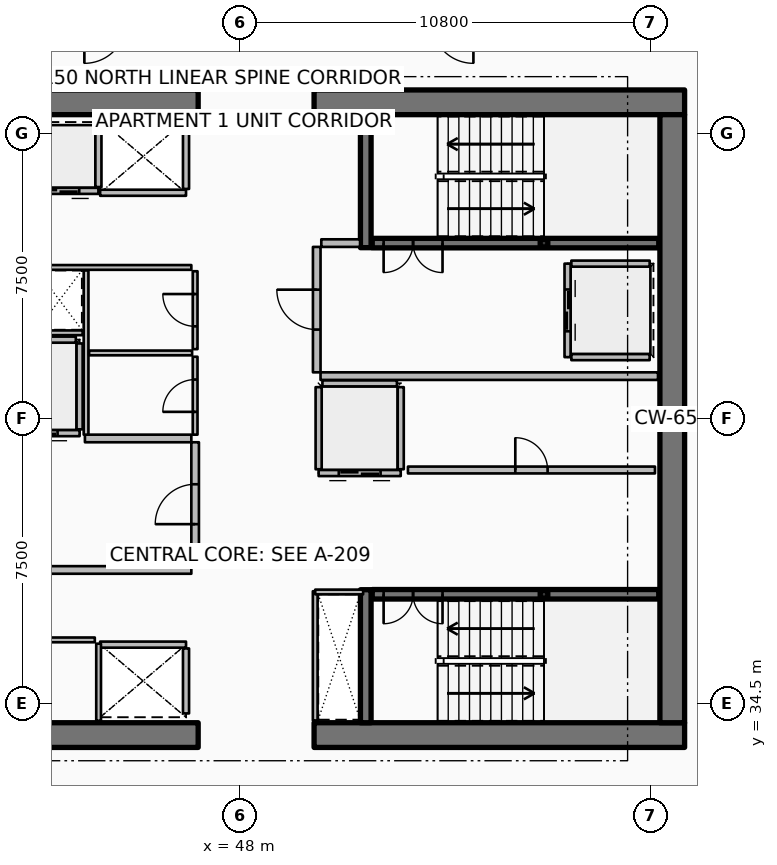
"""IFC4 building model, lengths in metres.
Left out: names, types, materials, properties, quantities, classifications, styles, units other than length and angle.
Written with IfcOpenShell. Run it as: python <this file> out.ifc"""

import sys

from ifc_helpers import new_model, si_unit, direction, frame, frame_2d, origin, origin_2d, place, context, subcontext, project, spatial, rectangle, hollow_rectangle, extrude, element, fill, save


model = new_model("IFC4")
c1 = context("Model", 3, precision=1e-05, world=origin(), true_north=direction((0.0, 1.0)))
c2 = subcontext(c1, "Body", "Model", "MODEL_VIEW")
j1 = project(units=[si_unit("LENGTHUNIT", "METRE"), si_unit("PLANEANGLEUNIT", "RADIAN")], contexts=[c1])
p1 = place(None, origin())
s1 = spatial("IfcSite", under=j1, at=p1, CompositionType="ELEMENT")
p2 = place(p1, origin())
s2 = spatial("IfcBuilding", under=s1, at=p2, CompositionType="ELEMENT")
p3 = place(p2, frame((0.0, 0.0, 199.05)))
s3 = spatial("IfcBuildingStorey", under=s2, at=p3, CompositionType="ELEMENT", Elevation=199.05)
for number, where, z_axis, x_axis in (
    (1, (37.15, 33.675, 0.0), (0.0, 0.0, 1.0), (1.0, 0.0, 0.0)),
    (2, (49.95, 33.675, 0.0), (0.0, 0.0, 1.0), (1.0, 0.0, 0.0)),
    (3, (37.15, 50.325, 0.0), (0.0, 0.0, 1.0), (1.0, 0.0, 0.0)),
    (4, (49.95, 50.325, 0.0), (0.0, 0.0, 1.0), (1.0, 0.0, 0.0)),
):
    element("IfcWall", number, at=place(p3, frame(where, z_axis=z_axis, x_axis=x_axis)), inside=s3, PredefinedType="SHEAR", context=c2, shape_type="SweptSolid", body=[
        extrude(rectangle(XDim=9.75, YDim=0.65, at=frame_2d((4.875, 0.0))), origin(), (0.0, 0.0, 1.0), 3.75),
    ])
p4 = place(p3, frame((59.375, 34.0, 0.0), z_axis=(0.0, 0.0, 1.0), x_axis=(0.0, 1.0, 0.0)))
e5 = element("IfcWall", 5, at=p4, inside=s3, PredefinedType="SHEAR", context=c2, shape_type="SweptSolid", body=[
    extrude(rectangle(XDim=16.0, YDim=0.65, at=frame_2d((8.0, 0.0))), origin(), (0.0, 0.0, 1.0), 3.75),
])
for number, where, z_axis, x_axis in (
    (6, (51.31, 46.5, 0.0), (0.0, 0.0, 1.0), (0.0, 1.0, 0.0)),
    (7, (51.31, 34.0, 0.0), (0.0, 0.0, 1.0), (0.0, 1.0, 0.0)),
):
    element("IfcWall", number, at=place(p3, frame(where, z_axis=z_axis, x_axis=x_axis)), inside=s3, PredefinedType="SHEAR", context=c2, shape_type="SweptSolid", body=[
        extrude(rectangle(XDim=3.5, YDim=0.28, at=frame_2d((1.75, 0.0))), origin(), (0.0, 0.0, 1.0), 3.75),
    ])
for number, where, z_axis, x_axis in (
    (8, (56.0, 46.62, 0.0), (0.0, 0.0, 1.0), (1.0, 0.0, 0.0)),
    (9, (56.0, 37.38, 0.0), (0.0, 0.0, 1.0), (1.0, 0.0, 0.0)),
):
    element("IfcColumn", number, at=place(p3, frame(where, z_axis=z_axis, x_axis=x_axis)), inside=s3, PredefinedType="COLUMN", context=c2, shape_type="SweptSolid", body=[
        extrude(hollow_rectangle(XDim=0.2, YDim=0.2, WallThickness=0.01, InnerFilletRadius=0.01, OuterFilletRadius=0.02, at=origin_2d()), origin(), (0.0, 0.0, 1.0), 1.67),
    ])
p5 = place(p3, frame((51.48, 46.62, 0.0), z_axis=(0.0, 0.0, 1.0), x_axis=(1.0, 0.0, 0.0)))
e10 = element("IfcWall", 10, at=p5, inside=s3, PredefinedType="SOLIDWALL", context=c2, shape_type="SweptSolid", body=[
    extrude(rectangle(XDim=7.54, YDim=0.25, at=frame_2d((3.77, 0.0))), origin(), (0.0, 0.0, 1.0), 3.5),
])
p6 = place(p5, frame((0.3, 0.0, 0.0)))
e11 = element("IfcOpeningElement", 11, at=p6, cuts=e10, PredefinedType="OPENING", context=c2, shape_type="SweptSolid", body=[
    extrude(rectangle(XDim=1.55, YDim=2.15, at=frame_2d((0.775, 1.075))), frame((0.0, 0.135, 0.0), z_axis=(0.0, -1.0, 0.0), x_axis=(1.0, 0.0, 0.0)), (0.0, 0.0, 1.0), 0.27),
])
p7 = place(p3, frame((51.48, 37.38, 0.0), z_axis=(0.0, 0.0, 1.0), x_axis=(1.0, 0.0, 0.0)))
e12 = element("IfcWall", 12, at=p7, inside=s3, PredefinedType="SOLIDWALL", context=c2, shape_type="SweptSolid", body=[
    extrude(rectangle(XDim=7.54, YDim=0.25, at=frame_2d((3.77, 0.0))), origin(), (0.0, 0.0, 1.0), 3.5),
])
p8 = place(p7, frame((0.3, 0.0, 0.0)))
e13 = element("IfcOpeningElement", 13, at=p8, cuts=e12, PredefinedType="OPENING", context=c2, shape_type="SweptSolid", body=[
    extrude(rectangle(XDim=1.55, YDim=2.15, at=frame_2d((0.775, 1.075))), frame((0.0, 0.135, 0.0), z_axis=(0.0, -1.0, 0.0), x_axis=(1.0, 0.0, 0.0)), (0.0, 0.0, 1.0), 0.27),
])
p9 = place(p3, frame((44.275, 47.995, 0.0), z_axis=(0.0, 0.0, 1.0), x_axis=(-1.0, 0.0, 0.0)))
e14 = element("IfcWall", 14, at=p9, inside=s3, PredefinedType="PARTITIONING", context=c2, shape_type="SweptSolid", body=[
    extrude(rectangle(XDim=2.11, YDim=0.16, at=frame_2d((1.055, 0.0))), origin(), (0.0, 0.0, 1.0), 3.5),
])
p10 = place(p9, frame((0.505, 0.0, 0.0)))
e15 = element("IfcOpeningElement", 15, at=p10, cuts=e14, PredefinedType="OPENING", context=c2, shape_type="SweptSolid", body=[
    extrude(rectangle(XDim=1.1, YDim=2.1, at=frame_2d((0.55, 1.05))), frame((0.0, 0.09, 0.0), z_axis=(0.0, -1.0, 0.0), x_axis=(1.0, 0.0, 0.0)), (0.0, 0.0, 1.0), 0.18),
])
p11 = place(p3, frame((44.275, 48.095, 0.0), z_axis=(0.0, 0.0, 1.0), x_axis=(0.0, 1.0, 0.0)))
e16 = element("IfcWall", 16, at=p11, inside=s3, PredefinedType="PARTITIONING", context=c2, shape_type="SweptSolid", body=[
    extrude(rectangle(XDim=1.61, YDim=0.16, at=frame_2d((0.805, 0.0))), origin(), (0.0, 0.0, 1.0), 3.5),
])
p12 = place(p3, frame((46.58, 47.945, 0.0), z_axis=(0.0, 0.0, 1.0), x_axis=(-1.0, 0.0, 0.0)))
e17 = element("IfcWall", 17, at=p12, inside=s3, PredefinedType="PARTITIONING", context=c2, shape_type="SweptSolid", body=[
    extrude(rectangle(XDim=2.26, YDim=0.16, at=frame_2d((1.13, 0.0))), origin(), (0.0, 0.0, 1.0), 3.5),
])
p13 = place(p3, frame((46.58, 48.045, 0.0), z_axis=(0.0, 0.0, 1.0), x_axis=(0.0, 1.0, 0.0)))
e18 = element("IfcWall", 18, at=p13, inside=s3, PredefinedType="PARTITIONING", context=c2, shape_type="SweptSolid", body=[
    extrude(rectangle(XDim=1.71, YDim=0.16, at=frame_2d((0.855, 0.0))), origin(), (0.0, 0.0, 1.0), 3.5),
])
p14 = place(p3, frame((44.32, 36.055, 0.0), z_axis=(0.0, 0.0, 1.0), x_axis=(1.0, 0.0, 0.0)))
e19 = element("IfcWall", 19, at=p14, inside=s3, PredefinedType="PARTITIONING", context=c2, shape_type="SweptSolid", body=[
    extrude(rectangle(XDim=2.26, YDim=0.16, at=frame_2d((1.13, 0.0))), origin(), (0.0, 0.0, 1.0), 3.5),
])
p15 = place(p3, frame((46.58, 34.245, 0.0), z_axis=(0.0, 0.0, 1.0), x_axis=(0.0, 1.0, 0.0)))
e20 = element("IfcWall", 20, at=p15, inside=s3, PredefinedType="PARTITIONING", context=c2, shape_type="SweptSolid", body=[
    extrude(rectangle(XDim=1.71, YDim=0.16, at=frame_2d((0.855, 0.0))), origin(), (0.0, 0.0, 1.0), 3.5),
])
p16 = place(p3, frame((43.78, 41.62, 0.0), z_axis=(0.0, 0.0, 1.0), x_axis=(-1.0, 0.0, 0.0)))
e21 = element("IfcWall", 21, at=p16, inside=s3, PredefinedType="PARTITIONING", context=c2, shape_type="SweptSolid", body=[
    extrude(rectangle(XDim=2.26, YDim=0.16, at=frame_2d((1.13, 0.0))), origin(), (0.0, 0.0, 1.0), 3.5),
])
p17 = place(p16, frame((0.58, 0.0, 0.0)))
e22 = element("IfcOpeningElement", 22, at=p17, cuts=e21, PredefinedType="OPENING", context=c2, shape_type="SweptSolid", body=[
    extrude(rectangle(XDim=1.1, YDim=2.1, at=frame_2d((0.55, 1.05))), frame((0.0, 0.09, 0.0), z_axis=(0.0, -1.0, 0.0), x_axis=(1.0, 0.0, 0.0)), (0.0, 0.0, 1.0), 0.18),
])
p18 = place(p3, frame((43.78, 41.72, 0.0), z_axis=(0.0, 0.0, 1.0), x_axis=(0.0, 1.0, 0.0)))
e23 = element("IfcWall", 23, at=p18, inside=s3, PredefinedType="PARTITIONING", context=c2, shape_type="SweptSolid", body=[
    extrude(rectangle(XDim=2.26, YDim=0.16, at=frame_2d((1.13, 0.0))), origin(), (0.0, 0.0, 1.0), 3.5),
])
p19 = place(p3, frame((41.62, 44.08, 0.0), z_axis=(0.0, 0.0, 1.0), x_axis=(1.0, 0.0, 0.0)))
e24 = element("IfcWall", 24, at=p19, inside=s3, PredefinedType="PARTITIONING", context=c2, shape_type="SweptSolid", body=[
    extrude(rectangle(XDim=2.06, YDim=0.16, at=frame_2d((1.03, 0.0))), origin(), (0.0, 0.0, 1.0), 3.5),
])
p20 = place(p3, frame((56.62, 46.08, 0.0), z_axis=(0.0, 0.0, 1.0), x_axis=(0.0, -1.0, 0.0)))
e25 = element("IfcWall", 25, at=p20, inside=s3, PredefinedType="PARTITIONING", context=c2, shape_type="SweptSolid", body=[
    extrude(rectangle(XDim=2.46, YDim=0.16, at=frame_2d((1.23, 0.0))), origin(), (0.0, 0.0, 1.0), 3.5),
])
p21 = place(p20, frame((0.68, 0.0, 0.0)))
e26 = element("IfcOpeningElement", 26, at=p21, cuts=e25, PredefinedType="OPENING", context=c2, shape_type="SweptSolid", body=[
    extrude(rectangle(XDim=1.1, YDim=2.1, at=frame_2d((0.55, 1.05))), frame((0.0, 0.09, 0.0), z_axis=(0.0, -1.0, 0.0), x_axis=(1.0, 0.0, 0.0)), (0.0, 0.0, 1.0), 0.18),
])
for number, where, z_axis, x_axis in (
    (27, (56.72, 46.08, 0.0), (0.0, 0.0, 1.0), (1.0, 0.0, 0.0)),
    (28, (56.72, 43.62, 0.0), (0.0, 0.0, 1.0), (1.0, 0.0, 0.0)),
):
    element("IfcWall", number, at=place(p3, frame(where, z_axis=z_axis, x_axis=x_axis)), inside=s3, PredefinedType="PARTITIONING", context=c2, shape_type="SweptSolid", body=[
        extrude(rectangle(XDim=2.06, YDim=0.16, at=frame_2d((1.03, 0.0))), origin(), (0.0, 0.0, 1.0), 3.5),
    ])
p22 = place(p3, frame((52.23, 40.57, 0.0), z_axis=(0.0, 0.0, 1.0), x_axis=(-1.0, 0.0, 0.0)))
e29 = element("IfcWall", 29, at=p22, inside=s3, PredefinedType="PARTITIONING", context=c2, shape_type="SweptSolid", body=[
    extrude(rectangle(XDim=2.16, YDim=0.16, at=frame_2d((1.08, 0.0))), origin(), (0.0, 0.0, 1.0), 3.5),
])
p23 = place(p22, frame((0.53, 0.0, 0.0)))
e30 = element("IfcOpeningElement", 30, at=p23, cuts=e29, PredefinedType="OPENING", context=c2, shape_type="SweptSolid", body=[
    extrude(rectangle(XDim=1.1, YDim=2.1, at=frame_2d((0.55, 1.05))), frame((0.0, 0.09, 0.0), z_axis=(0.0, -1.0, 0.0), x_axis=(1.0, 0.0, 0.0)), (0.0, 0.0, 1.0), 0.18),
])
for number, where, z_axis, x_axis in (
    (31, (52.23, 40.67, 0.0), (0.0, 0.0, 1.0), (0.0, 1.0, 0.0)),
    (32, (50.07, 40.67, 0.0), (0.0, 0.0, 1.0), (0.0, 1.0, 0.0)),
):
    element("IfcWall", number, at=place(p3, frame(where, z_axis=z_axis, x_axis=x_axis)), inside=s3, PredefinedType="PARTITIONING", context=c2, shape_type="SweptSolid", body=[
        extrude(rectangle(XDim=2.16, YDim=0.16, at=frame_2d((1.08, 0.0))), origin(), (0.0, 0.0, 1.0), 3.5),
    ])
p24 = place(p3, frame((50.17, 42.93, 0.0), z_axis=(0.0, 0.0, 1.0), x_axis=(1.0, 0.0, 0.0)))
e33 = element("IfcWall", 33, at=p24, inside=s3, PredefinedType="PARTITIONING", context=c2, shape_type="SweptSolid", body=[
    extrude(rectangle(XDim=1.96, YDim=0.16, at=frame_2d((0.98, 0.0))), origin(), (0.0, 0.0, 1.0), 3.5),
])
p25 = place(p3, frame((52.42, 40.65, 0.0), z_axis=(0.0, 0.0, 1.0), x_axis=(1.0, 0.0, 0.0)))
e34 = element("IfcWall", 34, at=p25, inside=s3, PredefinedType="PARTITIONING", context=c2, shape_type="SweptSolid", body=[
    extrude(rectangle(XDim=6.5, YDim=0.18, at=frame_2d((3.25, 0.0))), origin(), (0.0, 0.0, 1.0), 3.5),
])
p26 = place(p25, frame((2.825, 0.0, 0.0)))
e35 = element("IfcOpeningElement", 35, at=p26, cuts=e34, PredefinedType="OPENING", context=c2, shape_type="SweptSolid", body=[
    extrude(rectangle(XDim=0.85, YDim=2.06, at=frame_2d((0.425, 1.03))), frame((0.0, 0.1, 0.0), z_axis=(0.0, -1.0, 0.0), x_axis=(1.0, 0.0, 0.0)), (0.0, 0.0, 1.0), 0.2),
])
p27 = place(p3, frame((44.28, 34.05, 0.0), z_axis=(0.0, 0.0, 1.0), x_axis=(0.0, 1.0, 0.0)))
e36 = element("IfcWall", 36, at=p27, inside=s3, PredefinedType="PARTITIONING", context=c2, shape_type="SweptSolid", body=[
    extrude(rectangle(XDim=2.03, YDim=0.125, at=frame_2d((1.015, 0.0))), origin(), (0.0, 0.0, 1.0), 2.94),
])
p28 = place(p3, frame((37.92, 36.18, 0.0), z_axis=(0.0, 0.0, 1.0), x_axis=(1.0, 0.0, 0.0)))
e37 = element("IfcWall", 37, at=p28, inside=s3, PredefinedType="PARTITIONING", context=c2, shape_type="SweptSolid", body=[
    extrude(rectangle(XDim=6.26, YDim=0.125, at=frame_2d((3.13, 0.0))), origin(), (0.0, 0.0, 1.0), 2.94),
])
p29 = place(p28, frame((2.705, 0.0, 0.0)))
e38 = element("IfcOpeningElement", 38, at=p29, cuts=e37, PredefinedType="OPENING", context=c2, shape_type="SweptSolid", body=[
    extrude(rectangle(XDim=0.85, YDim=2.06, at=frame_2d((0.425, 1.03))), frame((0.0, 0.073, 0.0), z_axis=(0.0, -1.0, 0.0), x_axis=(1.0, 0.0, 0.0)), (0.0, 0.0, 1.0), 0.145),
])
p30 = place(p3, frame((41.35, 38.02, 0.0), z_axis=(0.0, 0.0, 1.0), x_axis=(1.0, 0.0, 0.0)))
e39 = element("IfcWall", 39, at=p30, inside=s3, PredefinedType="PARTITIONING", context=c2, shape_type="SweptSolid", body=[
    extrude(rectangle(XDim=5.37, YDim=0.2, at=frame_2d((2.685, 0.0))), origin(), (0.0, 0.0, 1.0), 3.5),
])
p31 = place(p3, frame((43.92, 41.48, 0.0), z_axis=(0.0, 0.0, 1.0), x_axis=(1.0, 0.0, 0.0)))
e40 = element("IfcWall", 40, at=p31, inside=s3, PredefinedType="PARTITIONING", context=c2, shape_type="SweptSolid", body=[
    extrude(rectangle(XDim=2.8, YDim=0.2, at=frame_2d((1.4, 0.0))), origin(), (0.0, 0.0, 1.0), 3.5),
])
p32 = place(p3, frame((46.82, 38.12, 0.0), z_axis=(0.0, 0.0, 1.0), x_axis=(0.0, 1.0, 0.0)))
e41 = element("IfcWall", 41, at=p32, inside=s3, PredefinedType="PARTITIONING", context=c2, shape_type="SweptSolid", body=[
    extrude(rectangle(XDim=3.26, YDim=0.2, at=frame_2d((1.63, 0.0))), origin(), (0.0, 0.0, 1.0), 3.5),
])
p33 = place(p32, frame((1.105, 0.0, 0.0)))
e42 = element("IfcOpeningElement", 42, at=p33, cuts=e41, PredefinedType="OPENING", context=c2, shape_type="SweptSolid", body=[
    extrude(rectangle(XDim=1.05, YDim=2.1, at=frame_2d((0.525, 1.05))), frame((0.0, 0.11, 0.0), z_axis=(0.0, -1.0, 0.0), x_axis=(1.0, 0.0, 0.0)), (0.0, 0.0, 1.0), 0.22),
])
p34 = place(p3, frame((50.12, 43.12, 0.0), z_axis=(0.0, 0.0, 1.0), x_axis=(1.0, 0.0, 0.0)))
e43 = element("IfcWall", 43, at=p34, inside=s3, PredefinedType="PARTITIONING", context=c2, shape_type="SweptSolid", body=[
    extrude(rectangle(XDim=8.88, YDim=0.2, at=frame_2d((4.44, 0.0))), origin(), (0.0, 0.0, 1.0), 3.5),
])
p35 = place(p3, frame((50.14, 46.62, 0.0), z_axis=(0.0, 0.0, 1.0), x_axis=(1.0, 0.0, 0.0)))
e44 = element("IfcWall", 44, at=p35, inside=s3, PredefinedType="PARTITIONING", context=c2, shape_type="SweptSolid", body=[
    extrude(rectangle(XDim=1.02, YDim=0.2, at=frame_2d((0.51, 0.0))), origin(), (0.0, 0.0, 1.0), 3.5),
])
p36 = place(p3, frame((50.02, 43.22, 0.0), z_axis=(0.0, 0.0, 1.0), x_axis=(0.0, 1.0, 0.0)))
e45 = element("IfcWall", 45, at=p36, inside=s3, PredefinedType="PARTITIONING", context=c2, shape_type="SweptSolid", body=[
    extrude(rectangle(XDim=3.3, YDim=0.2, at=frame_2d((1.65, 0.0))), origin(), (0.0, 0.0, 1.0), 3.5),
])
p37 = place(p36, frame((1.125, 0.0, 0.0)))
e46 = element("IfcOpeningElement", 46, at=p37, cuts=e45, PredefinedType="OPENING", context=c2, shape_type="SweptSolid", body=[
    extrude(rectangle(XDim=1.05, YDim=2.1, at=frame_2d((0.525, 1.05))), frame((0.0, 0.11, 0.0), z_axis=(0.0, -1.0, 0.0), x_axis=(1.0, 0.0, 0.0)), (0.0, 0.0, 1.0), 0.22),
])
p38 = place(p3, frame((41.36, 45.98, 0.0), z_axis=(0.0, 0.0, 1.0), x_axis=(1.0, 0.0, 0.0)))
e47 = element("IfcWall", 47, at=p38, inside=s3, PredefinedType="PARTITIONING", context=c2, shape_type="SweptSolid", body=[
    extrude(rectangle(XDim=5.36, YDim=0.125, at=frame_2d((2.68, 0.0))), origin(), (0.0, 0.0, 1.0), 2.94),
])
p39 = place(p3, frame((41.36, 44.26, 0.0), z_axis=(0.0, 0.0, 1.0), x_axis=(1.0, 0.0, 0.0)))
e48 = element("IfcWall", 48, at=p39, inside=s3, PredefinedType="PARTITIONING", context=c2, shape_type="SweptSolid", body=[
    extrude(rectangle(XDim=2.5, YDim=0.125, at=frame_2d((1.25, 0.0))), origin(), (0.0, 0.0, 1.0), 2.94),
])
p40 = place(p3, frame((49.98, 34.06, 0.0), z_axis=(0.0, 0.0, 1.0), x_axis=(0.0, 1.0, 0.0)))
e49 = element("IfcWall", 49, at=p40, inside=s3, PredefinedType="PARTITIONING", context=c2, shape_type="SweptSolid", body=[
    extrude(rectangle(XDim=3.4, YDim=0.125, at=frame_2d((1.7, 0.0))), origin(), (0.0, 0.0, 1.0), 2.94),
])
p41 = place(p3, frame((49.98, 37.44, 0.0), z_axis=(0.0, 0.0, 1.0), x_axis=(1.0, 0.0, 0.0)))
e50 = element("IfcWall", 50, at=p41, inside=s3, PredefinedType="PARTITIONING", context=c2, shape_type="SweptSolid", body=[
    extrude(rectangle(XDim=1.26, YDim=0.125, at=frame_2d((0.63, 0.0))), origin(), (0.0, 0.0, 1.0), 2.94),
])
p42 = place(p3, frame((43.95, 41.58, 0.0), z_axis=(0.0, 0.0, 1.0), x_axis=(0.0, 1.0, 0.0)))
e51 = element("IfcWall", 51, at=p42, inside=s3, PredefinedType="PARTITIONING", context=c2, shape_type="SweptSolid", body=[
    extrude(rectangle(XDim=4.32, YDim=0.125, at=frame_2d((2.16, 0.0))), origin(), (0.0, 0.0, 1.0), 2.94),
])
p43 = place(p3, frame((44.03, 43.73, 0.0), z_axis=(0.0, 0.0, 1.0), x_axis=(1.0, 0.0, 0.0)))
e52 = element("IfcWall", 52, at=p43, inside=s3, PredefinedType="PARTITIONING", context=c2, shape_type="SweptSolid", body=[
    extrude(rectangle(XDim=2.71, YDim=0.125, at=frame_2d((1.355, 0.0))), origin(), (0.0, 0.0, 1.0), 2.94),
])
p44 = place(p3, frame((46.82, 41.58, 0.0), z_axis=(0.0, 0.0, 1.0), x_axis=(0.0, 1.0, 0.0)))
e53 = element("IfcWall", 53, at=p44, inside=s3, PredefinedType="PARTITIONING", context=c2, shape_type="SweptSolid", body=[
    extrude(rectangle(XDim=2.05, YDim=0.125, at=frame_2d((1.025, 0.0))), origin(), (0.0, 0.0, 1.0), 2.94),
])
p45 = place(p44, frame((0.6, 0.0, 0.0)))
e54 = element("IfcOpeningElement", 54, at=p45, cuts=e53, PredefinedType="OPENING", context=c2, shape_type="SweptSolid", body=[
    extrude(rectangle(XDim=0.85, YDim=2.06, at=frame_2d((0.425, 1.03))), frame((0.0, 0.073, 0.0), z_axis=(0.0, -1.0, 0.0), x_axis=(1.0, 0.0, 0.0)), (0.0, 0.0, 1.0), 0.145),
])
p46 = place(p3, frame((46.82, 43.83, 0.0), z_axis=(0.0, 0.0, 1.0), x_axis=(0.0, 1.0, 0.0)))
e55 = element("IfcWall", 55, at=p46, inside=s3, PredefinedType="PARTITIONING", context=c2, shape_type="SweptSolid", body=[
    extrude(rectangle(XDim=2.05, YDim=0.125, at=frame_2d((1.025, 0.0))), origin(), (0.0, 0.0, 1.0), 2.94),
])
p47 = place(p46, frame((0.6, 0.0, 0.0)))
e56 = element("IfcOpeningElement", 56, at=p47, cuts=e55, PredefinedType="OPENING", context=c2, shape_type="SweptSolid", body=[
    extrude(rectangle(XDim=0.85, YDim=2.06, at=frame_2d((0.425, 1.03))), frame((0.0, 0.073, 0.0), z_axis=(0.0, -1.0, 0.0), x_axis=(1.0, 0.0, 0.0)), (0.0, 0.0, 1.0), 0.145),
])
p48 = place(p6, origin())
e57 = element("IfcDoor", 57, at=p48, inside=s3, OperationType="DOUBLE_DOOR_SINGLE_SWING", PredefinedType="DOOR", context=c2, shape_type="SweptSolid", body=[
    extrude(rectangle(XDim=1.55, YDim=2.15, at=frame_2d((0.775, 1.075))), frame((0.0, 0.025, 0.0), z_axis=(0.0, -1.0, 0.0), x_axis=(1.0, 0.0, 0.0)), (0.0, 0.0, 1.0), 0.05),
])
fill(e11, e57)
p49 = place(p8, origin())
e58 = element("IfcDoor", 58, at=p49, inside=s3, OperationType="DOUBLE_DOOR_SINGLE_SWING", PredefinedType="DOOR", context=c2, shape_type="SweptSolid", body=[
    extrude(rectangle(XDim=1.55, YDim=2.15, at=frame_2d((0.775, 1.075))), frame((0.0, 0.025, 0.0), z_axis=(0.0, -1.0, 0.0), x_axis=(1.0, 0.0, 0.0)), (0.0, 0.0, 1.0), 0.05),
])
fill(e13, e58)
p50 = place(p10, origin())
e59 = element("IfcDoor", 59, at=p50, inside=s3, OperationType="DOUBLE_DOOR_SLIDING", PredefinedType="DOOR", context=c2, shape_type="SweptSolid", body=[
    extrude(rectangle(XDim=1.1, YDim=2.1, at=frame_2d((0.55, 1.05))), frame((0.0, 0.025, 0.0), z_axis=(0.0, -1.0, 0.0), x_axis=(1.0, 0.0, 0.0)), (0.0, 0.0, 1.0), 0.05),
])
fill(e15, e59)
p51 = place(p17, origin())
e60 = element("IfcDoor", 60, at=p51, inside=s3, OperationType="DOUBLE_DOOR_SLIDING", PredefinedType="DOOR", context=c2, shape_type="SweptSolid", body=[
    extrude(rectangle(XDim=1.1, YDim=2.1, at=frame_2d((0.55, 1.05))), frame((0.0, 0.025, 0.0), z_axis=(0.0, -1.0, 0.0), x_axis=(1.0, 0.0, 0.0)), (0.0, 0.0, 1.0), 0.05),
])
fill(e22, e60)
p52 = place(p21, origin())
e61 = element("IfcDoor", 61, at=p52, inside=s3, OperationType="DOUBLE_DOOR_SLIDING", PredefinedType="DOOR", context=c2, shape_type="SweptSolid", body=[
    extrude(rectangle(XDim=1.1, YDim=2.1, at=frame_2d((0.55, 1.05))), frame((0.0, 0.025, 0.0), z_axis=(0.0, -1.0, 0.0), x_axis=(1.0, 0.0, 0.0)), (0.0, 0.0, 1.0), 0.05),
])
fill(e26, e61)
p53 = place(p23, origin())
e62 = element("IfcDoor", 62, at=p53, inside=s3, OperationType="DOUBLE_DOOR_SLIDING", PredefinedType="DOOR", context=c2, shape_type="SweptSolid", body=[
    extrude(rectangle(XDim=1.1, YDim=2.1, at=frame_2d((0.55, 1.05))), frame((0.0, 0.025, 0.0), z_axis=(0.0, -1.0, 0.0), x_axis=(1.0, 0.0, 0.0)), (0.0, 0.0, 1.0), 0.05),
])
fill(e30, e62)
p54 = place(p26, origin())
e63 = element("IfcDoor", 63, at=p54, inside=s3, OperationType="SINGLE_SWING_LEFT", PredefinedType="DOOR", context=c2, shape_type="SweptSolid", body=[
    extrude(rectangle(XDim=0.85, YDim=2.06, at=frame_2d((0.425, 1.03))), frame((0.0, 0.025, 0.0), z_axis=(0.0, -1.0, 0.0), x_axis=(1.0, 0.0, 0.0)), (0.0, 0.0, 1.0), 0.05),
])
fill(e35, e63)
p55 = place(p33, origin())
e64 = element("IfcDoor", 64, at=p55, inside=s3, OperationType="SINGLE_SWING_LEFT", PredefinedType="DOOR", context=c2, shape_type="SweptSolid", body=[
    extrude(rectangle(XDim=1.05, YDim=2.1, at=frame_2d((0.525, 1.05))), frame((0.0, 0.025, 0.0), z_axis=(0.0, -1.0, 0.0), x_axis=(1.0, 0.0, 0.0)), (0.0, 0.0, 1.0), 0.05),
])
fill(e42, e64)
p56 = place(p37, origin())
e65 = element("IfcDoor", 65, at=p56, inside=s3, OperationType="SINGLE_SWING_RIGHT", PredefinedType="DOOR", context=c2, shape_type="SweptSolid", body=[
    extrude(rectangle(XDim=1.05, YDim=2.1, at=frame_2d((0.525, 1.05))), frame((0.0, 0.025, 0.0), z_axis=(0.0, -1.0, 0.0), x_axis=(1.0, 0.0, 0.0)), (0.0, 0.0, 1.0), 0.05),
])
fill(e46, e65)
p57 = place(p45, origin())
e66 = element("IfcDoor", 66, at=p57, inside=s3, OperationType="SINGLE_SWING_LEFT", PredefinedType="DOOR", context=c2, shape_type="SweptSolid", body=[
    extrude(rectangle(XDim=0.85, YDim=2.06, at=frame_2d((0.425, 1.03))), frame((0.0, 0.025, 0.0), z_axis=(0.0, -1.0, 0.0), x_axis=(1.0, 0.0, 0.0)), (0.0, 0.0, 1.0), 0.05),
])
fill(e54, e66)
p58 = place(p47, origin())
e67 = element("IfcDoor", 67, at=p58, inside=s3, OperationType="SINGLE_SWING_RIGHT", PredefinedType="DOOR", context=c2, shape_type="SweptSolid", body=[
    extrude(rectangle(XDim=0.85, YDim=2.06, at=frame_2d((0.425, 1.03))), frame((0.0, 0.025, 0.0), z_axis=(0.0, -1.0, 0.0), x_axis=(1.0, 0.0, 0.0)), (0.0, 0.0, 1.0), 0.05),
])
fill(e56, e67)
save(model, sys.argv[1])
